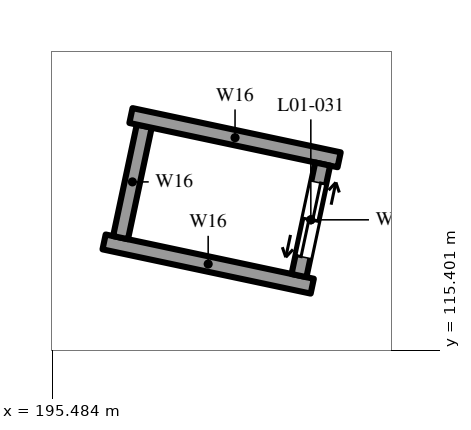
"""IFC4 building model, lengths in metres.
Left out: names, types, materials, properties, quantities, classifications, styles, units other than length and angle.
Written with IfcOpenShell. Run it as: python <this file> out.ifc"""

import sys

from ifc_helpers import new_model, si_unit, direction, frame, frame_2d, origin, place, context, subcontext, project, spatial, rectangle, extrude, element, fill, save


model = new_model("IFC4")
c1 = context("Model", 3, precision=1e-05, world=origin(), true_north=direction((0.0, 1.0)))
c2 = subcontext(c1, "Body", "Model", "MODEL_VIEW")
j1 = project(units=[si_unit("LENGTHUNIT", "METRE"), si_unit("PLANEANGLEUNIT", "RADIAN")], contexts=[c1])
p1 = place(None, origin())
s1 = spatial("IfcSite", under=j1, at=p1, CompositionType="ELEMENT")
p2 = place(p1, origin())
s2 = spatial("IfcBuilding", under=s1, at=p2, CompositionType="ELEMENT")
p3 = place(p2, frame((0.0, 0.0, 7.2)))
s3 = spatial("IfcBuildingStorey", under=s2, at=p3, CompositionType="ELEMENT", Elevation=7.2)
p4 = place(p3, frame((196.164, 116.823, 0.0), z_axis=(0.0, 0.0, 1.0), x_axis=(0.978138015478, -0.207956780791, 0.0)))
e1 = element("IfcWall", 1, at=p4, inside=s3, PredefinedType="SOLIDWALL", context=c2, shape_type="SweptSolid", body=[
    extrude(rectangle(XDim=2.8, YDim=0.2, at=frame_2d((1.4, 0.0))), origin(), (0.0, 0.0, 1.0), 4.48),
])
p5 = place(p3, frame((196.381, 116.88, 0.0), z_axis=(0.0, 0.0, 1.0), x_axis=(0.20783929028, 0.978162987143, 0.0)))
e2 = element("IfcWall", 2, at=p5, inside=s3, PredefinedType="SOLIDWALL", context=c2, shape_type="SweptSolid", body=[
    extrude(rectangle(XDim=1.5, YDim=0.2, at=frame_2d((0.75, 0.0))), origin(), (0.0, 0.0, 1.0), 4.48),
])
p6 = place(p3, frame((196.518, 118.486, 0.0), z_axis=(0.0, 0.0, 1.0), x_axis=(0.978138015478, -0.207956780791, 0.0)))
e3 = element("IfcWall", 3, at=p6, inside=s3, PredefinedType="SOLIDWALL", context=c2, shape_type="SweptSolid", body=[
    extrude(rectangle(XDim=2.8, YDim=0.2, at=frame_2d((1.4, 0.0))), origin(), (0.0, 0.0, 1.0), 4.48),
])
p7 = place(p3, frame((198.728, 116.381, 0.0), z_axis=(0.0, 0.0, 1.0), x_axis=(0.207995007687, 0.978129887478, 0.0)))
e4 = element("IfcWall", 4, at=p7, inside=s3, PredefinedType="SOLIDWALL", context=c2, shape_type="SweptSolid", body=[
    extrude(rectangle(XDim=1.5, YDim=0.2, at=frame_2d((0.75, 0.0))), origin(), (0.0, 0.0, 1.0), 4.48),
])
p8 = place(p7, frame((0.25, 0.0, 0.0)))
e5 = element("IfcOpeningElement", 5, at=p8, cuts=e4, PredefinedType="OPENING", context=c2, shape_type="SweptSolid", body=[
    extrude(rectangle(XDim=1.0, YDim=2.1, at=frame_2d((0.5, 1.05))), frame((0.0, 0.11, 0.0), z_axis=(0.0, -1.0, 0.0), x_axis=(1.0, 0.0, 0.0)), (0.0, 0.0, 1.0), 0.22),
])
p9 = place(p3, frame((191.856, 105.215, 0.0), z_axis=(0.0, 0.0, 1.0), x_axis=(0.207914134202, 0.978147081373, 0.0)))
e6 = element("IfcWall", 6, at=p9, inside=s3, PredefinedType="SOLIDWALL", context=c2, shape_type="SweptSolid", body=[
    extrude(rectangle(XDim=36.75, YDim=0.2, at=frame_2d((18.375, 0.0))), origin(), (0.0, 0.0, 1.0), 4.49),
])
p10 = place(p9, frame((3.5, 0.0, 0.9)))
e7 = element("IfcOpeningElement", 7, at=p10, cuts=e6, PredefinedType="OPENING", context=c2, shape_type="SweptSolid", body=[
    extrude(rectangle(XDim=3.0, YDim=2.4, at=frame_2d((1.5, 1.2))), frame((0.0, 0.11, 0.0), z_axis=(0.0, -1.0, 0.0), x_axis=(1.0, 0.0, 0.0)), (0.0, 0.0, 1.0), 0.22),
])
p11 = place(p9, frame((9.5, 0.0, 0.9)))
e8 = element("IfcOpeningElement", 8, at=p11, cuts=e6, PredefinedType="OPENING", context=c2, shape_type="SweptSolid", body=[
    extrude(rectangle(XDim=3.0, YDim=2.4, at=frame_2d((1.5, 1.2))), frame((0.0, 0.11, 0.0), z_axis=(0.0, -1.0, 0.0), x_axis=(1.0, 0.0, 0.0)), (0.0, 0.0, 1.0), 0.22),
])
p12 = place(p9, frame((15.5, 0.0, 0.9)))
e9 = element("IfcOpeningElement", 9, at=p12, cuts=e6, PredefinedType="OPENING", context=c2, shape_type="SweptSolid", body=[
    extrude(rectangle(XDim=3.0, YDim=2.4, at=frame_2d((1.5, 1.2))), frame((0.0, 0.11, 0.0), z_axis=(0.0, -1.0, 0.0), x_axis=(1.0, 0.0, 0.0)), (0.0, 0.0, 1.0), 0.22),
])
p13 = place(p9, frame((21.5, 0.0, 0.9)))
e10 = element("IfcOpeningElement", 10, at=p13, cuts=e6, PredefinedType="OPENING", context=c2, shape_type="SweptSolid", body=[
    extrude(rectangle(XDim=3.0, YDim=2.4, at=frame_2d((1.5, 1.2))), frame((0.0, 0.11, 0.0), z_axis=(0.0, -1.0, 0.0), x_axis=(1.0, 0.0, 0.0)), (0.0, 0.0, 1.0), 0.22),
])
p14 = place(p9, frame((27.5, 0.0, 0.9)))
e11 = element("IfcOpeningElement", 11, at=p14, cuts=e6, PredefinedType="OPENING", context=c2, shape_type="SweptSolid", body=[
    extrude(rectangle(XDim=3.0, YDim=2.4, at=frame_2d((1.5, 1.2))), frame((0.0, 0.11, 0.0), z_axis=(0.0, -1.0, 0.0), x_axis=(1.0, 0.0, 0.0)), (0.0, 0.0, 1.0), 0.22),
])
p15 = place(p8, frame((1.0, 0.0, 0.0), z_axis=(0.0, 0.0, 1.0), x_axis=(-1.0, 0.0, 0.0)))
e12 = element("IfcDoor", 12, at=p15, inside=s3, OperationType="DOUBLE_DOOR_SLIDING", PredefinedType="DOOR", context=c2, shape_type="SweptSolid", body=[
    extrude(rectangle(XDim=1.0, YDim=2.1, at=frame_2d((0.5, 1.05))), frame((0.0, 0.025, 0.0), z_axis=(0.0, -1.0, 0.0), x_axis=(1.0, 0.0, 0.0)), (0.0, 0.0, 1.0), 0.05),
])
fill(e5, e12)
save(model, sys.argv[1])
